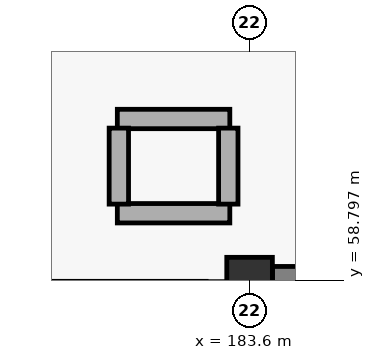
"""IFC4 building model, lengths in metres.
Left out: names, types, materials, properties, quantities, classifications, styles, units other than length and angle.
Written with IfcOpenShell. Run it as: python <this file> out.ifc"""

import sys

from ifc_helpers import new_model, si_unit, direction, frame, frame_2d, origin, origin_2d, place, context, subcontext, project, spatial, rectangle, extrude, element, save


model = new_model("IFC4")
c1 = context("Model", 3, precision=1e-05, world=origin(), true_north=direction((0.0, 1.0)))
c2 = subcontext(c1, "Body", "Model", "MODEL_VIEW")
j1 = project(units=[si_unit("LENGTHUNIT", "METRE"), si_unit("PLANEANGLEUNIT", "RADIAN")], contexts=[c1])
p1 = place(None, origin())
s1 = spatial("IfcSite", under=j1, at=p1, CompositionType="ELEMENT")
p2 = place(p1, origin())
s2 = spatial("IfcBuilding", under=s1, at=p2, CompositionType="ELEMENT")
p3 = place(p2, frame((0.0, 0.0, 26.4)))
s3 = spatial("IfcBuildingStorey", under=s2, at=p3, CompositionType="ELEMENT", Elevation=26.4)
p4 = place(p3, frame((183.6, 58.8, 0.0), z_axis=(0.0, 0.0, 1.0), x_axis=(1.0, 0.0, 0.0)))
e1 = element("IfcColumn", 1, at=p4, inside=s3, PredefinedType="COLUMN", context=c2, shape_type="SweptSolid", body=[
    extrude(rectangle(XDim=0.6, YDim=0.6, at=origin_2d()), origin(), (0.0, 0.0, 1.0), 4.5),
])
p5 = place(p3, frame((183.902, 58.8, 0.0), z_axis=(0.0, 0.0, 1.0), x_axis=(1.0, 0.0, 0.0)))
e2 = element("IfcWall", 2, at=p5, inside=s3, PredefinedType="SOLIDWALL", context=c2, shape_type="SweptSolid", body=[
    extrude(rectangle(XDim=7.796, YDim=0.36, at=frame_2d((3.898, 0.0))), origin(), (0.0, 0.0, 1.0), 3.74),
])
p6 = place(p5, frame((1.418, 0.0, 0.85)))
e3 = element("IfcOpeningElement", 3, at=p6, cuts=e2, PredefinedType="OPENING", context=c2, shape_type="SweptSolid", body=[
    extrude(rectangle(XDim=2.1, YDim=2.4, at=frame_2d((1.05, 1.2))), frame((0.0, 0.19, 0.0), z_axis=(0.0, -1.0, 0.0), x_axis=(1.0, 0.0, 0.0)), (0.0, 0.0, 1.0), 0.38),
])
p7 = place(p5, frame((4.418, 0.0, 0.85)))
e4 = element("IfcOpeningElement", 4, at=p7, cuts=e2, PredefinedType="OPENING", context=c2, shape_type="SweptSolid", body=[
    extrude(rectangle(XDim=2.25, YDim=2.25, at=frame_2d((1.125, 1.125))), frame((0.0, 0.19, 0.0), z_axis=(0.0, -1.0, 0.0), x_axis=(1.0, 0.0, 0.0)), (0.0, 0.0, 1.0), 0.38),
])
for number, where, z_axis, x_axis in (
    (5, (181.86, 60.92, 0.0), (0.0, 0.0, 1.0), (1.0, 0.0, 0.0)),
    (6, (181.86, 59.68, 0.0), (0.0, 0.0, 1.0), (1.0, 0.0, 0.0)),
):
    element("IfcWall", number, at=place(p3, frame(where, z_axis=z_axis, x_axis=x_axis)), inside=s3, PredefinedType="PARTITIONING", context=c2, shape_type="SweptSolid", body=[
        extrude(rectangle(XDim=1.48, YDim=0.255, at=frame_2d((0.74, 0.0))), origin(), (0.0, 0.0, 1.0), 3.78),
    ])
p8 = place(p3, frame((181.88, 59.8, 0.0), z_axis=(0.0, 0.0, 1.0), x_axis=(0.0, 1.0, 0.0)))
e7 = element("IfcWall", 7, at=p8, inside=s3, PredefinedType="PARTITIONING", context=c2, shape_type="SweptSolid", body=[
    extrude(rectangle(XDim=1.0, YDim=0.255, at=frame_2d((0.5, 0.0))), origin(), (0.0, 0.0, 1.0), 4.2),
])
p9 = place(p3, frame((183.32, 59.8, 0.0), z_axis=(0.0, 0.0, 1.0), x_axis=(0.0, 1.0, 0.0)))
e8 = element("IfcWall", 8, at=p9, inside=s3, PredefinedType="PARTITIONING", context=c2, shape_type="SweptSolid", body=[
    extrude(rectangle(XDim=1.0, YDim=0.255, at=frame_2d((0.5, 0.0))), origin(), (0.0, 0.0, 1.0), 3.78),
])
save(model, sys.argv[1])
